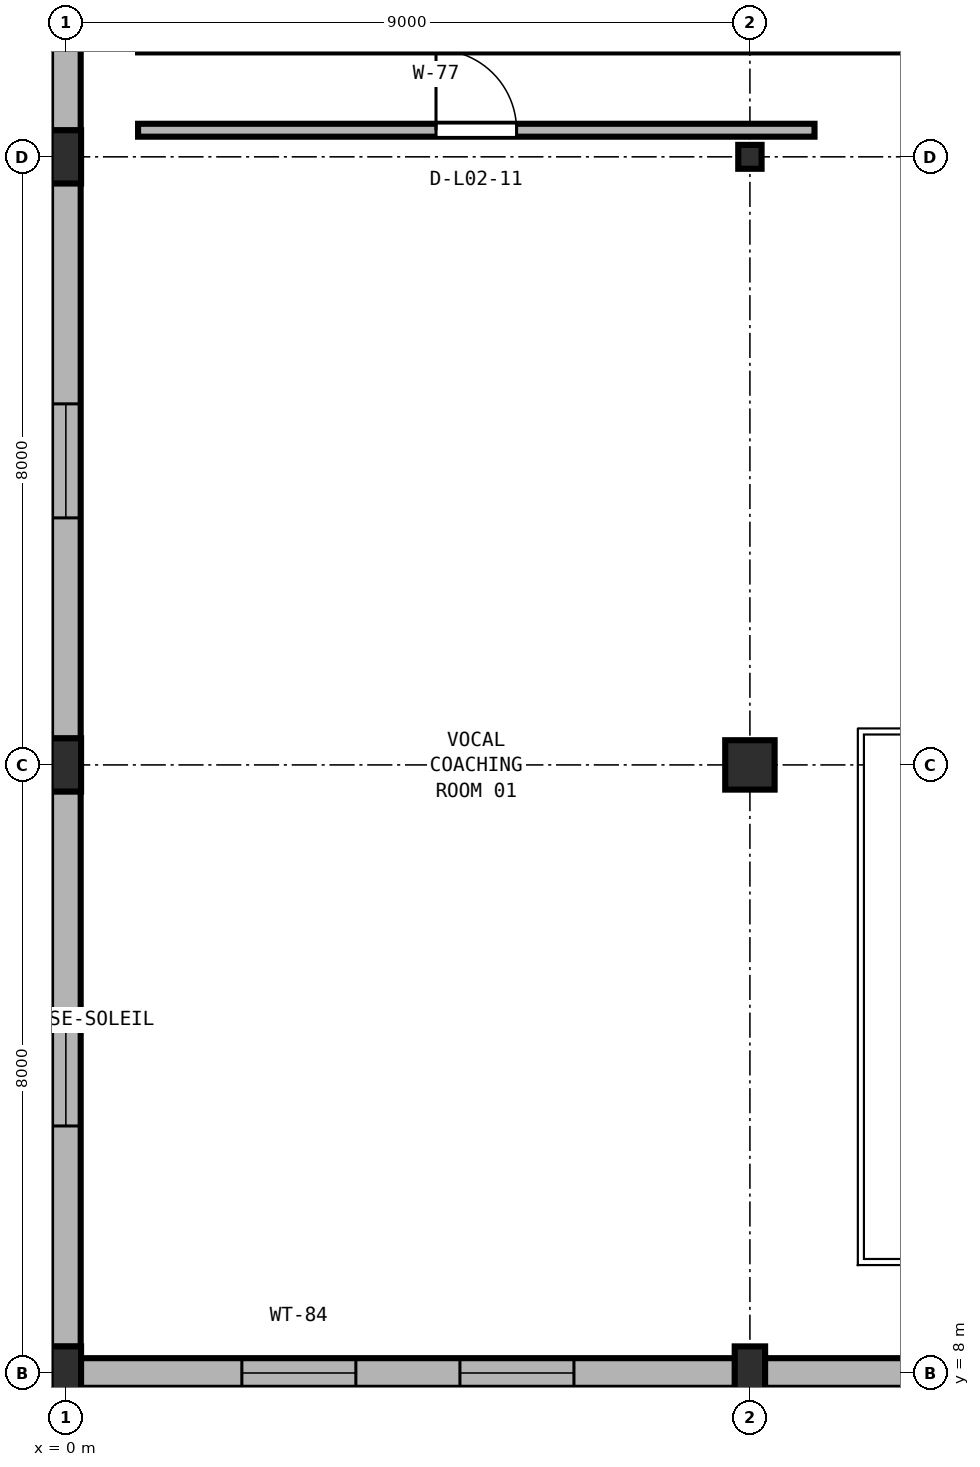
"""IFC4 building model, lengths in metres.
Left out: names, types, materials, properties, quantities, classifications, styles, units other than length and angle.
Written with IfcOpenShell. Run it as: python <this file> out.ifc"""

import sys

from ifc_helpers import new_model, si_unit, direction, frame, frame_2d, origin, origin_2d, place, context, subcontext, project, spatial, rectangle, i_section, extrude, element, fill, save


model = new_model("IFC4")
c1 = context("Model", 3, precision=1e-05, world=origin(), true_north=direction((0.0, 1.0)))
c2 = subcontext(c1, "Body", "Model", "MODEL_VIEW")
j1 = project(units=[si_unit("LENGTHUNIT", "METRE"), si_unit("PLANEANGLEUNIT", "RADIAN")], contexts=[c1])
p1 = place(None, origin())
s1 = spatial("IfcSite", under=j1, at=p1, CompositionType="ELEMENT")
p2 = place(p1, origin())
s2 = spatial("IfcBuilding", under=s1, at=p2, CompositionType="ELEMENT")
p3 = place(p2, frame((0.0, 0.0, 10.2)))
s3 = spatial("IfcBuildingStorey", under=s2, at=p3, CompositionType="ELEMENT", Elevation=10.2)
for number, where, z_axis, x_axis in (
    (1, (0.0, 8.0, 0.0), (0.0, 0.0, 1.0), (1.0, 0.0, 0.0)),
    (2, (0.0, 16.0, 0.0), (0.0, 0.0, 1.0), (1.0, 0.0, 0.0)),
    (3, (0.0, 24.0, 0.0), (0.0, 0.0, 1.0), (1.0, 0.0, 0.0)),
    (4, (9.0, 8.0, 0.0), (0.0, 0.0, 1.0), (1.0, 0.0, 0.0)),
):
    element("IfcColumn", number, at=place(p3, frame(where, z_axis=z_axis, x_axis=x_axis)), inside=s3, PredefinedType="PILASTER", context=c2, shape_type="SweptSolid", body=[
        extrude(rectangle(XDim=0.4, YDim=0.7, at=origin_2d()), origin(), (0.0, 0.0, 1.0), 4.24),
    ])
p4 = place(p3, frame((9.0, 16.0, 0.0), z_axis=(0.0, 0.0, 1.0), x_axis=(1.0, 0.0, 0.0)))
e5 = element("IfcColumn", 5, at=p4, inside=s3, PredefinedType="COLUMN", context=c2, shape_type="SweptSolid", body=[
    extrude(rectangle(XDim=0.65, YDim=0.65, at=origin_2d()), origin(), (0.0, 0.0, 1.0), 4.24),
])
p5 = place(p3, frame((9.0, 24.0, 0.0), z_axis=(0.0, 0.0, 1.0), x_axis=(1.0, 0.0, 0.0)))
e6 = element("IfcColumn", 6, at=p5, inside=s3, PredefinedType="COLUMN", context=c2, shape_type="SweptSolid", body=[
    extrude(i_section(OverallWidth=0.307, OverallDepth=0.315, WebThickness=0.012, FlangeThickness=0.019, FilletRadius=0.017, at=origin_2d()), origin(), (0.0, 0.0, 1.0), 4.24),
])
p6 = place(p3, frame((0.196, 8.0, 0.0), z_axis=(0.0, 0.0, 1.0), x_axis=(1.0, 0.0, 0.0)))
e7 = element("IfcWall", 7, at=p6, inside=s3, PredefinedType="SOLIDWALL", context=c2, shape_type="SweptSolid", body=[
    extrude(rectangle(XDim=8.608, YDim=0.39, at=frame_2d((4.304, 0.0))), origin(), (0.0, 0.0, 1.0), 3.852),
])
p7 = place(p6, frame((2.119, 0.0, 0.85)))
e8 = element("IfcOpeningElement", 8, at=p7, cuts=e7, PredefinedType="OPENING", context=c2, shape_type="SweptSolid", body=[
    extrude(rectangle(XDim=1.5, YDim=2.35, at=frame_2d((0.75, 1.175))), frame((0.0, 0.205, 0.0), z_axis=(0.0, -1.0, 0.0), x_axis=(1.0, 0.0, 0.0)), (0.0, 0.0, 1.0), 0.41),
])
p8 = place(p6, frame((4.989, 0.0, 0.85)))
e9 = element("IfcOpeningElement", 9, at=p8, cuts=e7, PredefinedType="OPENING", context=c2, shape_type="SweptSolid", body=[
    extrude(rectangle(XDim=1.5, YDim=2.35, at=frame_2d((0.75, 1.175))), frame((0.0, 0.205, 0.0), z_axis=(0.0, -1.0, 0.0), x_axis=(1.0, 0.0, 0.0)), (0.0, 0.0, 1.0), 0.41),
])
p9 = place(p3, frame((9.196, 8.0, 0.0), z_axis=(0.0, 0.0, 1.0), x_axis=(1.0, 0.0, 0.0)))
e10 = element("IfcWall", 10, at=p9, inside=s3, PredefinedType="SOLIDWALL", context=c2, shape_type="SweptSolid", body=[
    extrude(rectangle(XDim=8.608, YDim=0.39, at=frame_2d((4.304, 0.0))), origin(), (0.0, 0.0, 1.0), 3.852),
])
p10 = place(p9, frame((2.119, 0.0, 0.85)))
e11 = element("IfcOpeningElement", 11, at=p10, cuts=e10, PredefinedType="OPENING", context=c2, shape_type="SweptSolid", body=[
    extrude(rectangle(XDim=1.5, YDim=2.35, at=frame_2d((0.75, 1.175))), frame((0.0, 0.205, 0.0), z_axis=(0.0, -1.0, 0.0), x_axis=(1.0, 0.0, 0.0)), (0.0, 0.0, 1.0), 0.41),
])
p11 = place(p9, frame((4.989, 0.0, 0.85)))
e12 = element("IfcOpeningElement", 12, at=p11, cuts=e10, PredefinedType="OPENING", context=c2, shape_type="SweptSolid", body=[
    extrude(rectangle(XDim=1.5, YDim=2.35, at=frame_2d((0.75, 1.175))), frame((0.0, 0.205, 0.0), z_axis=(0.0, -1.0, 0.0), x_axis=(1.0, 0.0, 0.0)), (0.0, 0.0, 1.0), 0.41),
])
p12 = place(p3, frame((0.0, 8.346, 0.0), z_axis=(0.0, 0.0, 1.0), x_axis=(0.0, 1.0, 0.0)))
e13 = element("IfcWall", 13, at=p12, inside=s3, PredefinedType="SOLIDWALL", context=c2, shape_type="SweptSolid", body=[
    extrude(rectangle(XDim=7.308, YDim=0.39, at=frame_2d((3.654, 0.0))), origin(), (0.0, 0.0, 1.0), 3.852),
])
p13 = place(p12, frame((2.904, 0.0, 0.85)))
e14 = element("IfcOpeningElement", 14, at=p13, cuts=e13, PredefinedType="OPENING", context=c2, shape_type="SweptSolid", body=[
    extrude(rectangle(XDim=1.5, YDim=2.35, at=frame_2d((0.75, 1.175))), frame((0.0, 0.205, 0.0), z_axis=(0.0, -1.0, 0.0), x_axis=(1.0, 0.0, 0.0)), (0.0, 0.0, 1.0), 0.41),
])
p14 = place(p3, frame((0.0, 16.346, 0.0), z_axis=(0.0, 0.0, 1.0), x_axis=(0.0, 1.0, 0.0)))
e15 = element("IfcWall", 15, at=p14, inside=s3, PredefinedType="SOLIDWALL", context=c2, shape_type="SweptSolid", body=[
    extrude(rectangle(XDim=7.308, YDim=0.39, at=frame_2d((3.654, 0.0))), origin(), (0.0, 0.0, 1.0), 3.852),
])
p15 = place(p14, frame((2.904, 0.0, 0.85)))
e16 = element("IfcOpeningElement", 16, at=p15, cuts=e15, PredefinedType="OPENING", context=c2, shape_type="SweptSolid", body=[
    extrude(rectangle(XDim=1.5, YDim=2.35, at=frame_2d((0.75, 1.175))), frame((0.0, 0.205, 0.0), z_axis=(0.0, -1.0, 0.0), x_axis=(1.0, 0.0, 0.0)), (0.0, 0.0, 1.0), 0.41),
])
p16 = place(p3, frame((0.0, 24.346, 0.0), z_axis=(0.0, 0.0, 1.0), x_axis=(0.0, 1.0, 0.0)))
e17 = element("IfcWall", 17, at=p16, inside=s3, PredefinedType="SOLIDWALL", context=c2, shape_type="SweptSolid", body=[
    extrude(rectangle(XDim=7.308, YDim=0.39, at=frame_2d((3.654, 0.0))), origin(), (0.0, 0.0, 1.0), 3.852),
])
p17 = place(p16, frame((2.904, 0.0, 0.85)))
e18 = element("IfcOpeningElement", 18, at=p17, cuts=e17, PredefinedType="OPENING", context=c2, shape_type="SweptSolid", body=[
    extrude(rectangle(XDim=1.5, YDim=2.35, at=frame_2d((0.75, 1.175))), frame((0.0, 0.205, 0.0), z_axis=(0.0, -1.0, 0.0), x_axis=(1.0, 0.0, 0.0)), (0.0, 0.0, 1.0), 0.41),
])
p18 = place(p3, frame((0.95, 24.35, 0.0), z_axis=(0.0, 0.0, 1.0), x_axis=(1.0, 0.0, 0.0)))
e19 = element("IfcWall", 19, at=p18, inside=s3, PredefinedType="MOVABLE", context=c2, shape_type="SweptSolid", body=[
    extrude(rectangle(XDim=8.9, YDim=0.17, at=frame_2d((4.45, 0.0))), origin(), (0.0, 0.0, 1.0), 3.677),
])
p19 = place(p18, frame((3.92, 0.0, 0.0)))
e20 = element("IfcOpeningElement", 20, at=p19, cuts=e19, PredefinedType="OPENING", context=c2, shape_type="SweptSolid", body=[
    extrude(rectangle(XDim=1.06, YDim=2.2, at=frame_2d((0.53, 1.1))), frame((0.0, 0.095, 0.0), z_axis=(0.0, -1.0, 0.0), x_axis=(1.0, 0.0, 0.0)), (0.0, 0.0, 1.0), 0.19),
])
p20 = place(p3, frame((0.95, 25.45, 0.0), z_axis=(0.0, 0.0, 1.0), x_axis=(1.0, 0.0, 0.0)))
e21 = element("IfcWall", 21, at=p20, inside=s3, PredefinedType="MOVABLE", context=c2, shape_type="SweptSolid", body=[
    extrude(rectangle(XDim=17.9, YDim=0.152, at=frame_2d((8.95, 0.0))), origin(), (0.0, 0.0, 1.0), 4.19),
])
p21 = place(p20, frame((11.125, 0.0, 0.0)))
e22 = element("IfcOpeningElement", 22, at=p21, cuts=e21, PredefinedType="OPENING", context=c2, shape_type="SweptSolid", body=[
    extrude(rectangle(XDim=1.02, YDim=2.18, at=frame_2d((0.51, 1.09))), frame((0.0, 0.086, 0.0), z_axis=(0.0, -1.0, 0.0), x_axis=(1.0, 0.0, 0.0)), (0.0, 0.0, 1.0), 0.172),
])
p22 = place(p7, origin())
e23 = element("IfcWindow", 23, at=p22, inside=s3, PartitioningType="SINGLE_PANEL", PredefinedType="WINDOW", context=c2, shape_type="SweptSolid", body=[
    extrude(rectangle(XDim=1.5, YDim=2.35, at=frame_2d((0.75, 1.175))), frame((0.0, 0.03, 0.0), z_axis=(0.0, -1.0, 0.0), x_axis=(1.0, 0.0, 0.0)), (0.0, 0.0, 1.0), 0.06),
])
fill(e8, e23)
p23 = place(p8, origin())
e24 = element("IfcWindow", 24, at=p23, inside=s3, PartitioningType="SINGLE_PANEL", PredefinedType="WINDOW", context=c2, shape_type="SweptSolid", body=[
    extrude(rectangle(XDim=1.5, YDim=2.35, at=frame_2d((0.75, 1.175))), frame((0.0, 0.03, 0.0), z_axis=(0.0, -1.0, 0.0), x_axis=(1.0, 0.0, 0.0)), (0.0, 0.0, 1.0), 0.06),
])
fill(e9, e24)
p24 = place(p13, origin())
e25 = element("IfcWindow", 25, at=p24, inside=s3, PartitioningType="SINGLE_PANEL", PredefinedType="WINDOW", context=c2, shape_type="SweptSolid", body=[
    extrude(rectangle(XDim=1.5, YDim=2.35, at=frame_2d((0.75, 1.175))), frame((0.0, 0.03, 0.0), z_axis=(0.0, -1.0, 0.0), x_axis=(1.0, 0.0, 0.0)), (0.0, 0.0, 1.0), 0.06),
])
fill(e14, e25)
p25 = place(p15, origin())
e26 = element("IfcWindow", 26, at=p25, inside=s3, PartitioningType="SINGLE_PANEL", PredefinedType="WINDOW", context=c2, shape_type="SweptSolid", body=[
    extrude(rectangle(XDim=1.5, YDim=2.35, at=frame_2d((0.75, 1.175))), frame((0.0, 0.03, 0.0), z_axis=(0.0, -1.0, 0.0), x_axis=(1.0, 0.0, 0.0)), (0.0, 0.0, 1.0), 0.06),
])
fill(e16, e26)
p26 = place(p19, origin())
e27 = element("IfcDoor", 27, at=p26, inside=s3, OperationType="SINGLE_SWING_LEFT", PredefinedType="DOOR", context=c2, shape_type="SweptSolid", body=[
    extrude(rectangle(XDim=1.06, YDim=2.2, at=frame_2d((0.53, 1.1))), frame((0.0, 0.025, 0.0), z_axis=(0.0, -1.0, 0.0), x_axis=(1.0, 0.0, 0.0)), (0.0, 0.0, 1.0), 0.05),
])
fill(e20, e27)
save(model, sys.argv[1])
